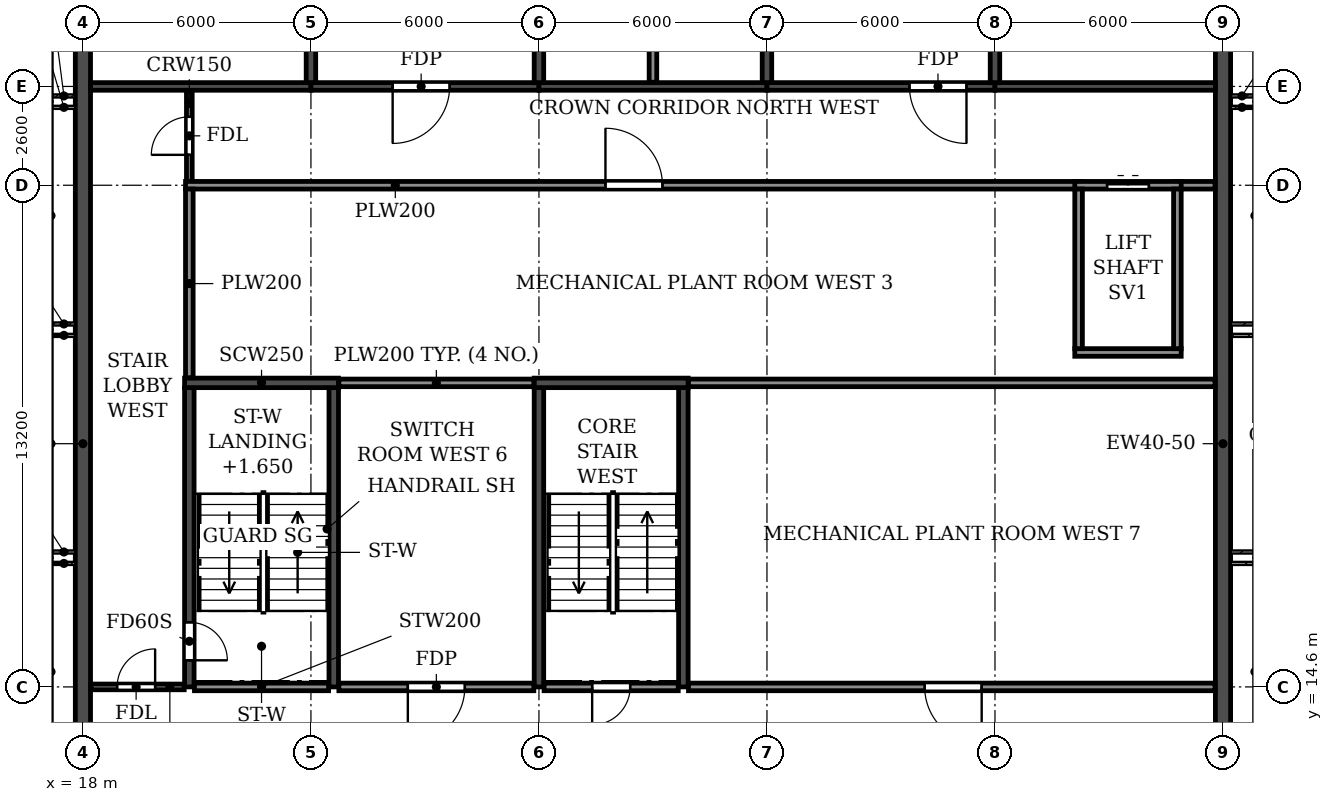
"""IFC4 building model, lengths in metres.
Left out: names, types, materials, properties, quantities, classifications, styles, units other than length and angle.
Written with IfcOpenShell. Run it as: python <this file> out.ifc"""

import sys

from ifc_helpers import new_model, si_unit, direction, frame, frame_2d, origin, place, context, subcontext, project, spatial, rectangle, extrude, element, fill, save


model = new_model("IFC4")
c1 = context("Model", 3, precision=1e-05, world=origin(), true_north=direction((0.0, 1.0)))
c2 = subcontext(c1, "Body", "Model", "MODEL_VIEW")
j1 = project(units=[si_unit("LENGTHUNIT", "METRE"), si_unit("PLANEANGLEUNIT", "RADIAN")], contexts=[c1])
p1 = place(None, origin())
s1 = spatial("IfcSite", under=j1, at=p1, CompositionType="ELEMENT")
p2 = place(p1, origin())
s2 = spatial("IfcBuilding", under=s1, at=p2, CompositionType="ELEMENT")
p3 = place(p2, frame((0.0, 0.0, 279.0)))
s3 = spatial("IfcBuildingStorey", under=s2, at=p3, CompositionType="ELEMENT", Elevation=279.0)
for number, where, z_axis, x_axis in (
    (1, (24.0, 30.5, 0.0), (0.0, 0.0, 1.0), (0.0, 1.0, 0.0)),
    (2, (30.0, 30.5, 0.0), (0.0, 0.0, 1.0), (0.0, 1.0, 0.0)),
    (3, (36.0, 30.5, 0.0), (0.0, 0.0, 1.0), (0.0, 1.0, 0.0)),
    (4, (42.0, 30.5, 0.0), (0.0, 0.0, 1.0), (0.0, 1.0, 0.0)),
):
    element("IfcWall", number, at=place(p3, frame(where, z_axis=z_axis, x_axis=x_axis)), inside=s3, PredefinedType="SHEAR", context=c2, shape_type="SweptSolid", body=[
        extrude(rectangle(XDim=10.5, YDim=0.25, at=frame_2d((5.25, 0.0))), origin(), (0.0, 0.0, 1.0), 3.05),
    ])
p4 = place(p3, frame((18.0, 4.683, 0.0), z_axis=(0.0, 0.0, 1.0), x_axis=(0.0, 1.0, 0.0)))
e5 = element("IfcWall", 5, at=p4, inside=s3, PredefinedType="SHEAR", context=c2, shape_type="SweptSolid", body=[
    extrude(rectangle(XDim=31.834, YDim=0.4, at=frame_2d((15.917, 0.0))), origin(), (0.0, 0.0, 1.0), 3.05),
])
p5 = place(p3, frame((48.0, 0.2, 0.0), z_axis=(0.0, 0.0, 1.0), x_axis=(0.0, 1.0, 0.0)))
e6 = element("IfcWall", 6, at=p5, inside=s3, PredefinedType="SHEAR", context=c2, shape_type="SweptSolid", body=[
    extrude(rectangle(XDim=40.8, YDim=0.4, at=frame_2d((20.4, 0.0))), origin(), (0.0, 0.0, 1.0), 3.05),
])
p6 = place(p3, frame((18.2, 30.4, 0.0), z_axis=(0.0, 0.0, 1.0), x_axis=(1.0, 0.0, 0.0)))
e7 = element("IfcWall", 7, at=p6, inside=s3, PredefinedType="SHEAR", context=c2, shape_type="SweptSolid", body=[
    extrude(rectangle(XDim=5.8, YDim=0.2, at=frame_2d((2.9, 0.0))), origin(), (0.0, 0.0, 1.0), 2.45),
])
p7 = place(p3, frame((24.0, 30.4, 0.0), z_axis=(0.0, 0.0, 1.0), x_axis=(1.0, 0.0, 0.0)))
e8 = element("IfcWall", 8, at=p7, inside=s3, PredefinedType="SHEAR", context=c2, shape_type="SweptSolid", body=[
    extrude(rectangle(XDim=6.0, YDim=0.2, at=frame_2d((3.0, 0.0))), origin(), (0.0, 0.0, 1.0), 2.45),
])
p8 = place(p7, frame((2.15, 0.0, 0.0)))
e9 = element("IfcOpeningElement", 9, at=p8, cuts=e8, PredefinedType="OPENING", context=c2, shape_type="SweptSolid", body=[
    extrude(rectangle(XDim=1.5, YDim=2.1, at=frame_2d((0.75, 1.05))), frame((0.0, 0.11, 0.0), z_axis=(0.0, -1.0, 0.0), x_axis=(1.0, 0.0, 0.0)), (0.0, 0.0, 1.0), 0.22),
])
p9 = place(p3, frame((30.0, 30.4, 0.0), z_axis=(0.0, 0.0, 1.0), x_axis=(1.0, 0.0, 0.0)))
e10 = element("IfcWall", 10, at=p9, inside=s3, PredefinedType="SHEAR", context=c2, shape_type="SweptSolid", body=[
    extrude(rectangle(XDim=6.0, YDim=0.2, at=frame_2d((3.0, 0.0))), origin(), (0.0, 0.0, 1.0), 2.45),
])
p10 = place(p3, frame((36.0, 30.4, 0.0), z_axis=(0.0, 0.0, 1.0), x_axis=(1.0, 0.0, 0.0)))
e11 = element("IfcWall", 11, at=p10, inside=s3, PredefinedType="SHEAR", context=c2, shape_type="SweptSolid", body=[
    extrude(rectangle(XDim=6.0, YDim=0.2, at=frame_2d((3.0, 0.0))), origin(), (0.0, 0.0, 1.0), 2.45),
])
p11 = place(p10, frame((3.75, 0.0, 0.0)))
e12 = element("IfcOpeningElement", 12, at=p11, cuts=e11, PredefinedType="OPENING", context=c2, shape_type="SweptSolid", body=[
    extrude(rectangle(XDim=1.5, YDim=2.1, at=frame_2d((0.75, 1.05))), frame((0.0, 0.11, 0.0), z_axis=(0.0, -1.0, 0.0), x_axis=(1.0, 0.0, 0.0)), (0.0, 0.0, 1.0), 0.22),
])
p12 = place(p3, frame((42.0, 30.4, 0.0), z_axis=(0.0, 0.0, 1.0), x_axis=(1.0, 0.0, 0.0)))
e13 = element("IfcWall", 13, at=p12, inside=s3, PredefinedType="SHEAR", context=c2, shape_type="SweptSolid", body=[
    extrude(rectangle(XDim=5.8, YDim=0.2, at=frame_2d((2.9, 0.0))), origin(), (0.0, 0.0, 1.0), 2.45),
])
p13 = place(p3, frame((20.8, 14.6, 0.0), z_axis=(0.0, 0.0, 1.0), x_axis=(0.0, 1.0, 0.0)))
e14 = element("IfcWall", 14, at=p13, inside=s3, PredefinedType="SOLIDWALL", context=c2, shape_type="SweptSolid", body=[
    extrude(rectangle(XDim=7.875, YDim=0.25, at=frame_2d((3.938, 0.0))), origin(), (0.0, 0.0, 1.0), 3.05),
])
p14 = place(p13, frame((0.7, 0.0, 0.0)))
e15 = element("IfcOpeningElement", 15, at=p14, cuts=e14, PredefinedType="OPENING", context=c2, shape_type="SweptSolid", body=[
    extrude(rectangle(XDim=1.0, YDim=2.1, at=frame_2d((0.5, 1.05))), frame((0.0, 0.135, 0.0), z_axis=(0.0, -1.0, 0.0), x_axis=(1.0, 0.0, 0.0)), (0.0, 0.0, 1.0), 0.27),
])
p15 = place(p3, frame((24.6, 14.6, 0.0), z_axis=(0.0, 0.0, 1.0), x_axis=(0.0, 1.0, 0.0)))
e16 = element("IfcWall", 16, at=p15, inside=s3, PredefinedType="SOLIDWALL", context=c2, shape_type="SweptSolid", body=[
    extrude(rectangle(XDim=7.875, YDim=0.25, at=frame_2d((3.938, 0.0))), origin(), (0.0, 0.0, 1.0), 3.05),
])
p16 = place(p3, frame((20.675, 22.6, 0.0), z_axis=(0.0, 0.0, 1.0), x_axis=(1.0, 0.0, 0.0)))
e17 = element("IfcWall", 17, at=p16, inside=s3, PredefinedType="SOLIDWALL", context=c2, shape_type="SweptSolid", body=[
    extrude(rectangle(XDim=4.05, YDim=0.25, at=frame_2d((2.025, 0.0))), origin(), (0.0, 0.0, 1.0), 3.05),
])
for number, where, z_axis, x_axis in (
    (18, (30.0, 14.6, 0.0), (0.0, 0.0, 1.0), (0.0, 1.0, 0.0)),
    (19, (33.8, 14.6, 0.0), (0.0, 0.0, 1.0), (0.0, 1.0, 0.0)),
):
    element("IfcWall", number, at=place(p3, frame(where, z_axis=z_axis, x_axis=x_axis)), inside=s3, PredefinedType="SOLIDWALL", context=c2, shape_type="SweptSolid", body=[
        extrude(rectangle(XDim=7.875, YDim=0.25, at=frame_2d((3.938, 0.0))), origin(), (0.0, 0.0, 1.0), 3.05),
    ])
p17 = place(p3, frame((29.875, 22.6, 0.0), z_axis=(0.0, 0.0, 1.0), x_axis=(1.0, 0.0, 0.0)))
e20 = element("IfcWall", 20, at=p17, inside=s3, PredefinedType="SOLIDWALL", context=c2, shape_type="SweptSolid", body=[
    extrude(rectangle(XDim=4.05, YDim=0.25, at=frame_2d((2.025, 0.0))), origin(), (0.0, 0.0, 1.0), 3.05),
])
p18 = place(p3, frame((18.21, 14.6, 0.0), z_axis=(0.0, 0.0, 1.0), x_axis=(1.0, 0.0, 0.0)))
e21 = element("IfcWall", 21, at=p18, inside=s3, PredefinedType="PARTITIONING", context=c2, shape_type="SweptSolid", body=[
    extrude(rectangle(XDim=2.455, YDim=0.15, at=frame_2d((1.228, 0.0))), origin(), (0.0, 0.0, 1.0), 3.05),
])
p19 = place(p18, frame((0.69, 0.0, 0.0)))
e22 = element("IfcOpeningElement", 22, at=p19, cuts=e21, PredefinedType="OPENING", context=c2, shape_type="SweptSolid", body=[
    extrude(rectangle(XDim=1.0, YDim=2.1, at=frame_2d((0.5, 1.05))), frame((0.0, 0.085, 0.0), z_axis=(0.0, -1.0, 0.0), x_axis=(1.0, 0.0, 0.0)), (0.0, 0.0, 1.0), 0.17),
])
p20 = place(p3, frame((20.8, 27.9, 0.0), z_axis=(0.0, 0.0, 1.0), x_axis=(0.0, 1.0, 0.0)))
e23 = element("IfcWall", 23, at=p20, inside=s3, PredefinedType="PARTITIONING", context=c2, shape_type="SweptSolid", body=[
    extrude(rectangle(XDim=2.39, YDim=0.15, at=frame_2d((1.195, 0.0))), origin(), (0.0, 0.0, 1.0), 3.05),
])
p21 = place(p20, frame((0.7, 0.0, 0.0)))
e24 = element("IfcOpeningElement", 24, at=p21, cuts=e23, PredefinedType="OPENING", context=c2, shape_type="SweptSolid", body=[
    extrude(rectangle(XDim=1.0, YDim=2.1, at=frame_2d((0.5, 1.05))), frame((0.0, 0.085, 0.0), z_axis=(0.0, -1.0, 0.0), x_axis=(1.0, 0.0, 0.0)), (0.0, 0.0, 1.0), 0.17),
])
p22 = place(p3, frame((24.735, 14.6, 0.0), z_axis=(0.0, 0.0, 1.0), x_axis=(1.0, 0.0, 0.0)))
e25 = element("IfcWall", 25, at=p22, inside=s3, PredefinedType="PARTITIONING", context=c2, shape_type="SweptSolid", body=[
    extrude(rectangle(XDim=5.13, YDim=0.2, at=frame_2d((2.565, 0.0))), origin(), (0.0, 0.0, 1.0), 3.05),
])
p23 = place(p22, frame((1.815, 0.0, 0.0)))
e26 = element("IfcOpeningElement", 26, at=p23, cuts=e25, PredefinedType="OPENING", context=c2, shape_type="SweptSolid", body=[
    extrude(rectangle(XDim=1.5, YDim=2.1, at=frame_2d((0.75, 1.05))), frame((0.0, 0.11, 0.0), z_axis=(0.0, -1.0, 0.0), x_axis=(1.0, 0.0, 0.0)), (0.0, 0.0, 1.0), 0.22),
])
p24 = place(p3, frame((33.935, 14.6, 0.0), z_axis=(0.0, 0.0, 1.0), x_axis=(1.0, 0.0, 0.0)))
e27 = element("IfcWall", 27, at=p24, inside=s3, PredefinedType="PARTITIONING", context=c2, shape_type="SweptSolid", body=[
    extrude(rectangle(XDim=13.855, YDim=0.2, at=frame_2d((6.927, 0.0))), origin(), (0.0, 0.0, 1.0), 3.05),
])
p25 = place(p24, frame((6.215, 0.0, 0.0)))
e28 = element("IfcOpeningElement", 28, at=p25, cuts=e27, PredefinedType="OPENING", context=c2, shape_type="SweptSolid", body=[
    extrude(rectangle(XDim=1.5, YDim=2.1, at=frame_2d((0.75, 1.05))), frame((0.0, 0.11, 0.0), z_axis=(0.0, -1.0, 0.0), x_axis=(1.0, 0.0, 0.0)), (0.0, 0.0, 1.0), 0.22),
])
p26 = place(p3, frame((24.735, 22.6, 0.0), z_axis=(0.0, 0.0, 1.0), x_axis=(1.0, 0.0, 0.0)))
e29 = element("IfcWall", 29, at=p26, inside=s3, PredefinedType="PARTITIONING", context=c2, shape_type="SweptSolid", body=[
    extrude(rectangle(XDim=5.13, YDim=0.2, at=frame_2d((2.565, 0.0))), origin(), (0.0, 0.0, 1.0), 3.05),
])
p27 = place(p3, frame((33.935, 22.6, 0.0), z_axis=(0.0, 0.0, 1.0), x_axis=(1.0, 0.0, 0.0)))
e30 = element("IfcWall", 30, at=p27, inside=s3, PredefinedType="PARTITIONING", context=c2, shape_type="SweptSolid", body=[
    extrude(rectangle(XDim=13.855, YDim=0.2, at=frame_2d((6.927, 0.0))), origin(), (0.0, 0.0, 1.0), 3.05),
])
p28 = place(p3, frame((20.7, 27.8, 0.0), z_axis=(0.0, 0.0, 1.0), x_axis=(1.0, 0.0, 0.0)))
e31 = element("IfcWall", 31, at=p28, inside=s3, PredefinedType="PARTITIONING", context=c2, shape_type="SweptSolid", body=[
    extrude(rectangle(XDim=23.6, YDim=0.2, at=frame_2d((11.8, 0.0))), origin(), (0.0, 0.0, 1.0), 3.05),
])
p29 = place(p28, frame((11.05, 0.0, 0.0)))
e32 = element("IfcOpeningElement", 32, at=p29, cuts=e31, PredefinedType="OPENING", context=c2, shape_type="SweptSolid", body=[
    extrude(rectangle(XDim=1.5, YDim=2.1, at=frame_2d((0.75, 1.05))), frame((0.0, 0.11, 0.0), z_axis=(0.0, -1.0, 0.0), x_axis=(1.0, 0.0, 0.0)), (0.0, 0.0, 1.0), 0.22),
])
p30 = place(p3, frame((46.7, 27.8, 0.0), z_axis=(0.0, 0.0, 1.0), x_axis=(1.0, 0.0, 0.0)))
e33 = element("IfcWall", 33, at=p30, inside=s3, PredefinedType="PARTITIONING", context=c2, shape_type="SweptSolid", body=[
    extrude(rectangle(XDim=1.09, YDim=0.2, at=frame_2d((0.545, 0.0))), origin(), (0.0, 0.0, 1.0), 3.05),
])
p31 = place(p3, frame((20.8, 22.735, 0.0), z_axis=(0.0, 0.0, 1.0), x_axis=(0.0, 1.0, 0.0)))
e34 = element("IfcWall", 34, at=p31, inside=s3, PredefinedType="PARTITIONING", context=c2, shape_type="SweptSolid", body=[
    extrude(rectangle(XDim=4.965, YDim=0.2, at=frame_2d((2.482, 0.0))), origin(), (0.0, 0.0, 1.0), 3.05),
])
p32 = place(p3, frame((33.0, 30.51, 0.0), z_axis=(0.0, 0.0, 1.0), x_axis=(0.0, 1.0, 0.0)))
e35 = element("IfcWall", 35, at=p32, inside=s3, PredefinedType="PARTITIONING", context=c2, shape_type="SweptSolid", body=[
    extrude(rectangle(XDim=10.63, YDim=0.2, at=frame_2d((5.315, 0.0))), origin(), (0.0, 0.0, 1.0), 3.05),
])
p33 = place(p3, frame((44.1, 23.4, 0.0), z_axis=(0.0, 0.0, 1.0), x_axis=(1.0, 0.0, 0.0)))
e36 = element("IfcWall", 36, at=p33, inside=s3, PredefinedType="PARTITIONING", context=c2, shape_type="SweptSolid", body=[
    extrude(rectangle(XDim=2.8, YDim=0.2, at=frame_2d((1.4, 0.0))), origin(), (0.0, 0.0, 1.0), 3.05),
])
p34 = place(p3, frame((44.1, 27.8, 0.0), z_axis=(0.0, 0.0, 1.0), x_axis=(1.0, 0.0, 0.0)))
e37 = element("IfcWall", 37, at=p34, inside=s3, PredefinedType="PARTITIONING", context=c2, shape_type="SweptSolid", body=[
    extrude(rectangle(XDim=2.8, YDim=0.2, at=frame_2d((1.4, 0.0))), origin(), (0.0, 0.0, 1.0), 3.05),
])
p35 = place(p34, frame((0.85, 0.0, 0.0)))
e38 = element("IfcOpeningElement", 38, at=p35, cuts=e37, PredefinedType="OPENING", context=c2, shape_type="SweptSolid", body=[
    extrude(rectangle(XDim=1.1, YDim=2.1, at=frame_2d((0.55, 1.05))), frame((0.0, 0.11, 0.0), z_axis=(0.0, -1.0, 0.0), x_axis=(1.0, 0.0, 0.0)), (0.0, 0.0, 1.0), 0.22),
])
for number, where, z_axis, x_axis in (
    (39, (44.2, 23.5, 0.0), (0.0, 0.0, 1.0), (0.0, 1.0, 0.0)),
    (40, (46.8, 23.5, 0.0), (0.0, 0.0, 1.0), (0.0, 1.0, 0.0)),
):
    element("IfcWall", number, at=place(p3, frame(where, z_axis=z_axis, x_axis=x_axis)), inside=s3, PredefinedType="PARTITIONING", context=c2, shape_type="SweptSolid", body=[
        extrude(rectangle(XDim=4.2, YDim=0.2, at=frame_2d((2.1, 0.0))), origin(), (0.0, 0.0, 1.0), 3.05),
    ])
p36 = place(p3, frame((20.935, 14.6, 0.0), z_axis=(0.0, 0.0, 1.0), x_axis=(1.0, 0.0, 0.0)))
e41 = element("IfcWall", 41, at=p36, inside=s3, PredefinedType="PARTITIONING", context=c2, shape_type="SweptSolid", body=[
    extrude(rectangle(XDim=3.53, YDim=0.2, at=frame_2d((1.765, 0.0))), origin(), (0.0, 0.0, 1.0), 3.05),
])
p37 = place(p3, frame((30.135, 14.6, 0.0), z_axis=(0.0, 0.0, 1.0), x_axis=(1.0, 0.0, 0.0)))
e42 = element("IfcWall", 42, at=p37, inside=s3, PredefinedType="PARTITIONING", context=c2, shape_type="SweptSolid", body=[
    extrude(rectangle(XDim=3.53, YDim=0.2, at=frame_2d((1.765, 0.0))), origin(), (0.0, 0.0, 1.0), 3.05),
])
p38 = place(p37, frame((1.265, 0.0, 0.0)))
e43 = element("IfcOpeningElement", 43, at=p38, cuts=e42, PredefinedType="OPENING", context=c2, shape_type="SweptSolid", body=[
    extrude(rectangle(XDim=1.0, YDim=2.1, at=frame_2d((0.5, 1.05))), frame((0.0, 0.11, 0.0), z_axis=(0.0, -1.0, 0.0), x_axis=(1.0, 0.0, 0.0)), (0.0, 0.0, 1.0), 0.22),
])
p39 = place(p8, frame((1.5, 0.0, 0.0), z_axis=(0.0, 0.0, 1.0), x_axis=(-1.0, 0.0, 0.0)))
e44 = element("IfcDoor", 44, at=p39, inside=s3, OperationType="DOUBLE_DOOR_SINGLE_SWING", PredefinedType="DOOR", context=c2, shape_type="SweptSolid", body=[
    extrude(rectangle(XDim=1.5, YDim=2.1, at=frame_2d((0.75, 1.05))), frame((0.0, 0.025, 0.0), z_axis=(0.0, -1.0, 0.0), x_axis=(1.0, 0.0, 0.0)), (0.0, 0.0, 1.0), 0.05),
])
fill(e9, e44)
p40 = place(p29, origin())
e45 = element("IfcDoor", 45, at=p40, inside=s3, OperationType="DOUBLE_DOOR_SINGLE_SWING", PredefinedType="DOOR", context=c2, shape_type="SweptSolid", body=[
    extrude(rectangle(XDim=1.5, YDim=2.1, at=frame_2d((0.75, 1.05))), frame((0.0, 0.025, 0.0), z_axis=(0.0, -1.0, 0.0), x_axis=(1.0, 0.0, 0.0)), (0.0, 0.0, 1.0), 0.05),
])
fill(e32, e45)
p41 = place(p11, frame((1.5, 0.0, 0.0), z_axis=(0.0, 0.0, 1.0), x_axis=(-1.0, 0.0, 0.0)))
e46 = element("IfcDoor", 46, at=p41, inside=s3, OperationType="DOUBLE_DOOR_SINGLE_SWING", PredefinedType="DOOR", context=c2, shape_type="SweptSolid", body=[
    extrude(rectangle(XDim=1.5, YDim=2.1, at=frame_2d((0.75, 1.05))), frame((0.0, 0.025, 0.0), z_axis=(0.0, -1.0, 0.0), x_axis=(1.0, 0.0, 0.0)), (0.0, 0.0, 1.0), 0.05),
])
fill(e12, e46)
p42 = place(p35, origin())
e47 = element("IfcDoor", 47, at=p42, inside=s3, OperationType="DOUBLE_DOOR_SLIDING", PredefinedType="DOOR", context=c2, shape_type="SweptSolid", body=[
    extrude(rectangle(XDim=1.1, YDim=2.1, at=frame_2d((0.55, 1.05))), frame((0.0, 0.025, 0.0), z_axis=(0.0, -1.0, 0.0), x_axis=(1.0, 0.0, 0.0)), (0.0, 0.0, 1.0), 0.05),
])
fill(e38, e47)
p43 = place(p23, frame((1.5, 0.0, 0.0), z_axis=(0.0, 0.0, 1.0), x_axis=(-1.0, 0.0, 0.0)))
e48 = element("IfcDoor", 48, at=p43, inside=s3, OperationType="DOUBLE_DOOR_SINGLE_SWING", PredefinedType="DOOR", context=c2, shape_type="SweptSolid", body=[
    extrude(rectangle(XDim=1.5, YDim=2.1, at=frame_2d((0.75, 1.05))), frame((0.0, 0.025, 0.0), z_axis=(0.0, -1.0, 0.0), x_axis=(1.0, 0.0, 0.0)), (0.0, 0.0, 1.0), 0.05),
])
fill(e26, e48)
p44 = place(p25, frame((1.5, 0.0, 0.0), z_axis=(0.0, 0.0, 1.0), x_axis=(-1.0, 0.0, 0.0)))
e49 = element("IfcDoor", 49, at=p44, inside=s3, OperationType="DOUBLE_DOOR_SINGLE_SWING", PredefinedType="DOOR", context=c2, shape_type="SweptSolid", body=[
    extrude(rectangle(XDim=1.5, YDim=2.1, at=frame_2d((0.75, 1.05))), frame((0.0, 0.025, 0.0), z_axis=(0.0, -1.0, 0.0), x_axis=(1.0, 0.0, 0.0)), (0.0, 0.0, 1.0), 0.05),
])
fill(e28, e49)
p45 = place(p19, origin())
e50 = element("IfcDoor", 50, at=p45, inside=s3, OperationType="SINGLE_SWING_RIGHT", PredefinedType="DOOR", context=c2, shape_type="SweptSolid", body=[
    extrude(rectangle(XDim=1.0, YDim=2.1, at=frame_2d((0.5, 1.05))), frame((0.0, 0.025, 0.0), z_axis=(0.0, -1.0, 0.0), x_axis=(1.0, 0.0, 0.0)), (0.0, 0.0, 1.0), 0.05),
])
fill(e22, e50)
p46 = place(p14, frame((1.0, 0.0, 0.0), z_axis=(0.0, 0.0, 1.0), x_axis=(-1.0, 0.0, 0.0)))
e51 = element("IfcDoor", 51, at=p46, inside=s3, OperationType="SINGLE_SWING_RIGHT", PredefinedType="DOOR", context=c2, shape_type="SweptSolid", body=[
    extrude(rectangle(XDim=1.0, YDim=2.1, at=frame_2d((0.5, 1.05))), frame((0.0, 0.025, 0.0), z_axis=(0.0, -1.0, 0.0), x_axis=(1.0, 0.0, 0.0)), (0.0, 0.0, 1.0), 0.05),
])
fill(e15, e51)
p47 = place(p21, origin())
e52 = element("IfcDoor", 52, at=p47, inside=s3, OperationType="SINGLE_SWING_LEFT", PredefinedType="DOOR", context=c2, shape_type="SweptSolid", body=[
    extrude(rectangle(XDim=1.0, YDim=2.1, at=frame_2d((0.5, 1.05))), frame((0.0, 0.025, 0.0), z_axis=(0.0, -1.0, 0.0), x_axis=(1.0, 0.0, 0.0)), (0.0, 0.0, 1.0), 0.05),
])
fill(e24, e52)
p48 = place(p38, frame((1.0, 0.0, 0.0), z_axis=(0.0, 0.0, 1.0), x_axis=(-1.0, 0.0, 0.0)))
e53 = element("IfcDoor", 53, at=p48, inside=s3, OperationType="SINGLE_SWING_RIGHT", PredefinedType="DOOR", context=c2, shape_type="SweptSolid", body=[
    extrude(rectangle(XDim=1.0, YDim=2.1, at=frame_2d((0.5, 1.05))), frame((0.0, 0.025, 0.0), z_axis=(0.0, -1.0, 0.0), x_axis=(1.0, 0.0, 0.0)), (0.0, 0.0, 1.0), 0.05),
])
fill(e43, e53)
save(model, sys.argv[1])
